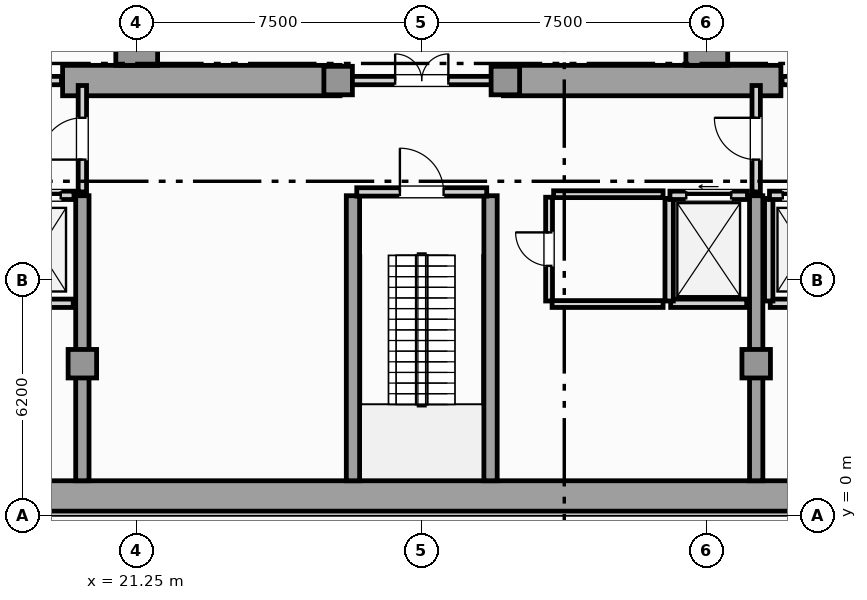
"""IFC4 building model, lengths in metres.
Left out: names, types, materials, properties, quantities, classifications, styles, units other than length and angle.
Written with IfcOpenShell. Run it as: python <this file> out.ifc"""

import sys

from ifc_helpers import new_model, si_unit, direction, frame, frame_2d, origin, origin_2d, place, context, subcontext, project, spatial, rectangle, extrude, element, fill, save


model = new_model("IFC4")
c1 = context("Model", 3, precision=1e-05, world=origin(), true_north=direction((0.0, 1.0)))
c2 = subcontext(c1, "Body", "Model", "MODEL_VIEW")
j1 = project(units=[si_unit("LENGTHUNIT", "METRE"), si_unit("PLANEANGLEUNIT", "RADIAN")], contexts=[c1])
p1 = place(None, origin())
s1 = spatial("IfcSite", under=j1, at=p1, CompositionType="ELEMENT")
p2 = place(p1, origin())
s2 = spatial("IfcBuilding", under=s1, at=p2, CompositionType="ELEMENT")
p3 = place(p2, frame((0.0, 0.0, -10.8)))
s3 = spatial("IfcBuildingStorey", under=s2, at=p3, CompositionType="ELEMENT", Elevation=-10.8)
p4 = place(p3, frame((13.25, 0.52, 0.0), z_axis=(0.0, 0.0, 1.0), x_axis=(1.0, 0.0, 0.0)))
e1 = element("IfcWall", 1, at=p4, inside=s3, PredefinedType="SHEAR", context=c2, shape_type="SweptSolid", body=[
    extrude(rectangle(XDim=31.0, YDim=0.8, at=frame_2d((15.5, 0.0))), origin(), (0.0, 0.0, 1.0), 5.05),
])
for number, where, z_axis, x_axis in (
    (2, (19.3, 11.45, 0.0), (0.0, 0.0, 1.0), (1.0, 0.0, 0.0)),
    (3, (30.9, 11.45, 0.0), (0.0, 0.0, 1.0), (1.0, 0.0, 0.0)),
):
    element("IfcWall", number, at=place(p3, frame(where, z_axis=z_axis, x_axis=x_axis)), inside=s3, PredefinedType="SHEAR", context=c2, shape_type="SweptSolid", body=[
        extrude(rectangle(XDim=7.3, YDim=0.8, at=frame_2d((3.65, 0.0))), origin(), (0.0, 0.0, 1.0), 5.05),
    ])
for number, where, z_axis, x_axis in (
    (4, (19.82, 0.92, 0.0), (0.0, 0.0, 1.0), (0.0, 1.0, 0.0)),
    (5, (26.94, 0.92, 0.0), (0.0, 0.0, 1.0), (0.0, 1.0, 0.0)),
    (6, (30.56, 0.92, 0.0), (0.0, 0.0, 1.0), (0.0, 1.0, 0.0)),
    (7, (37.55, 0.92, 0.0), (0.0, 0.0, 1.0), (0.0, 1.0, 0.0)),
):
    element("IfcWall", number, at=place(p3, frame(where, z_axis=z_axis, x_axis=x_axis)), inside=s3, PredefinedType="SHEAR", context=c2, shape_type="SweptSolid", body=[
        extrude(rectangle(XDim=7.5, YDim=0.35, at=frame_2d((3.75, 0.0))), origin(), (0.0, 0.0, 1.0), 5.05),
    ])
for number, where, z_axis, x_axis in (
    (8, (19.82, 4.0, 0.0), (0.0, 0.0, 1.0), (1.0, 0.0, 0.0)),
    (9, (37.55, 4.0, 0.0), (0.0, 0.0, 1.0), (1.0, 0.0, 0.0)),
    (10, (26.55, 11.45, 0.0), (0.0, 0.0, 1.0), (1.0, 0.0, 0.0)),
    (11, (30.95, 11.45, 0.0), (0.0, 0.0, 1.0), (1.0, 0.0, 0.0)),
):
    element("IfcColumn", number, at=place(p3, frame(where, z_axis=z_axis, x_axis=x_axis)), inside=s3, PredefinedType="COLUMN", context=c2, shape_type="SweptSolid", body=[
        extrude(rectangle(XDim=0.75, YDim=0.75, at=origin_2d()), origin(), (0.0, 0.0, 1.0), 5.4),
    ])
for number, where, z_axis, x_axis in (
    (12, (21.25, 12.4, 0.0), (0.0, 0.0, 1.0), (1.0, 0.0, 0.0)),
    (13, (36.25, 12.4, 0.0), (0.0, 0.0, 1.0), (1.0, 0.0, 0.0)),
):
    element("IfcColumn", number, at=place(p3, frame(where, z_axis=z_axis, x_axis=x_axis)), inside=s3, PredefinedType="COLUMN", context=c2, shape_type="SweptSolid", body=[
        extrude(rectangle(XDim=1.1, YDim=1.1, at=origin_2d()), origin(), (0.0, 0.0, 1.0), 5.4),
    ])
p5 = place(p3, frame((17.8, 5.59, 0.0), z_axis=(0.0, 0.0, 1.0), x_axis=(1.0, 0.0, 0.0)))
e14 = element("IfcWall", 14, at=p5, inside=s3, PredefinedType="SOLIDWALL", context=c2, shape_type="SweptSolid", body=[
    extrude(rectangle(XDim=1.78, YDim=0.22, at=frame_2d((0.89, 0.0))), origin(), (0.0, 0.0, 1.0), 5.05),
])
p6 = place(p3, frame((17.78, 8.43, 0.0), z_axis=(0.0, 0.0, 1.0), x_axis=(1.0, 0.0, 0.0)))
e15 = element("IfcWall", 15, at=p6, inside=s3, PredefinedType="SOLIDWALL", context=c2, shape_type="SweptSolid", body=[
    extrude(rectangle(XDim=1.82, YDim=0.22, at=frame_2d((0.91, 0.0))), origin(), (0.0, 0.0, 1.0), 5.05),
])
p7 = place(p6, frame((0.35, 0.0, 0.0)))
e16 = element("IfcOpeningElement", 16, at=p7, cuts=e15, PredefinedType="OPENING", context=c2, shape_type="SweptSolid", body=[
    extrude(rectangle(XDim=1.12, YDim=2.25, at=frame_2d((0.56, 1.125))), frame((0.0, 0.12, 0.0), z_axis=(0.0, -1.0, 0.0), x_axis=(1.0, 0.0, 0.0)), (0.0, 0.0, 1.0), 0.24),
])
p8 = place(p3, frame((37.92, 5.59, 0.0), z_axis=(0.0, 0.0, 1.0), x_axis=(1.0, 0.0, 0.0)))
e17 = element("IfcWall", 17, at=p8, inside=s3, PredefinedType="SOLIDWALL", context=c2, shape_type="SweptSolid", body=[
    extrude(rectangle(XDim=1.78, YDim=0.22, at=frame_2d((0.89, 0.0))), origin(), (0.0, 0.0, 1.0), 5.05),
])
p9 = place(p3, frame((37.88, 5.65, 0.0), z_axis=(0.0, 0.0, 1.0), x_axis=(0.0, 1.0, 0.0)))
e18 = element("IfcWall", 18, at=p9, inside=s3, PredefinedType="SOLIDWALL", context=c2, shape_type="SweptSolid", body=[
    extrude(rectangle(XDim=2.7, YDim=0.22, at=frame_2d((1.35, 0.0))), origin(), (0.0, 0.0, 1.0), 5.05),
])
p10 = place(p3, frame((37.9, 8.43, 0.0), z_axis=(0.0, 0.0, 1.0), x_axis=(1.0, 0.0, 0.0)))
e19 = element("IfcWall", 19, at=p10, inside=s3, PredefinedType="SOLIDWALL", context=c2, shape_type="SweptSolid", body=[
    extrude(rectangle(XDim=1.82, YDim=0.22, at=frame_2d((0.91, 0.0))), origin(), (0.0, 0.0, 1.0), 5.05),
])
p11 = place(p10, frame((0.35, 0.0, 0.0)))
e20 = element("IfcOpeningElement", 20, at=p11, cuts=e19, PredefinedType="OPENING", context=c2, shape_type="SweptSolid", body=[
    extrude(rectangle(XDim=1.12, YDim=2.25, at=frame_2d((0.56, 1.125))), frame((0.0, 0.12, 0.0), z_axis=(0.0, -1.0, 0.0), x_axis=(1.0, 0.0, 0.0)), (0.0, 0.0, 1.0), 0.24),
])
p12 = place(p3, frame((35.3, 5.59, 0.0), z_axis=(0.0, 0.0, 1.0), x_axis=(1.0, 0.0, 0.0)))
e21 = element("IfcWall", 21, at=p12, inside=s3, PredefinedType="SOLIDWALL", context=c2, shape_type="SweptSolid", body=[
    extrude(rectangle(XDim=2.0, YDim=0.22, at=frame_2d((1.0, 0.0))), origin(), (0.0, 0.0, 1.0), 5.05),
])
p13 = place(p3, frame((35.26, 5.65, 0.0), z_axis=(0.0, 0.0, 1.0), x_axis=(0.0, 1.0, 0.0)))
e22 = element("IfcWall", 22, at=p13, inside=s3, PredefinedType="SOLIDWALL", context=c2, shape_type="SweptSolid", body=[
    extrude(rectangle(XDim=2.7, YDim=0.22, at=frame_2d((1.35, 0.0))), origin(), (0.0, 0.0, 1.0), 5.05),
])
p14 = place(p3, frame((35.28, 8.43, 0.0), z_axis=(0.0, 0.0, 1.0), x_axis=(1.0, 0.0, 0.0)))
e23 = element("IfcWall", 23, at=p14, inside=s3, PredefinedType="SOLIDWALL", context=c2, shape_type="SweptSolid", body=[
    extrude(rectangle(XDim=2.04, YDim=0.22, at=frame_2d((1.02, 0.0))), origin(), (0.0, 0.0, 1.0), 5.05),
])
p15 = place(p14, frame((0.43, 0.0, 0.0)))
e24 = element("IfcOpeningElement", 24, at=p15, cuts=e23, PredefinedType="OPENING", context=c2, shape_type="SweptSolid", body=[
    extrude(rectangle(XDim=1.18, YDim=2.2, at=frame_2d((0.59, 1.1))), frame((0.0, 0.12, 0.0), z_axis=(0.0, -1.0, 0.0), x_axis=(1.0, 0.0, 0.0)), (0.0, 0.0, 1.0), 0.24),
])
p16 = place(p3, frame((27.04, 8.52, 0.0), z_axis=(0.0, 0.0, 1.0), x_axis=(1.0, 0.0, 0.0)))
e25 = element("IfcWall", 25, at=p16, inside=s3, PredefinedType="SOLIDWALL", context=c2, shape_type="SweptSolid", body=[
    extrude(rectangle(XDim=3.42, YDim=0.22, at=frame_2d((1.71, 0.0))), origin(), (0.0, 0.0, 1.0), 5.05),
])
p17 = place(p16, frame((1.135, 0.0, 0.0)))
e26 = element("IfcOpeningElement", 26, at=p17, cuts=e25, PredefinedType="OPENING", context=c2, shape_type="SweptSolid", body=[
    extrude(rectangle(XDim=1.15, YDim=2.2, at=frame_2d((0.575, 1.1))), frame((0.0, 0.12, 0.0), z_axis=(0.0, -1.0, 0.0), x_axis=(1.0, 0.0, 0.0)), (0.0, 0.0, 1.0), 0.24),
])
p18 = place(p3, frame((19.82, 8.52, 0.0), z_axis=(0.0, 0.0, 1.0), x_axis=(0.0, 1.0, 0.0)))
e27 = element("IfcWall", 27, at=p18, inside=s3, PredefinedType="SOLIDWALL", context=c2, shape_type="SweptSolid", body=[
    extrude(rectangle(XDim=2.8, YDim=0.22, at=frame_2d((1.4, 0.0))), origin(), (0.0, 0.0, 1.0), 4.506),
])
p19 = place(p18, frame((0.85, 0.0, 0.0)))
e28 = element("IfcOpeningElement", 28, at=p19, cuts=e27, PredefinedType="OPENING", context=c2, shape_type="SweptSolid", body=[
    extrude(rectangle(XDim=1.1, YDim=2.2, at=frame_2d((0.55, 1.1))), frame((0.0, 0.12, 0.0), z_axis=(0.0, -1.0, 0.0), x_axis=(1.0, 0.0, 0.0)), (0.0, 0.0, 1.0), 0.24),
])
p20 = place(p3, frame((37.55, 8.52, 0.0), z_axis=(0.0, 0.0, 1.0), x_axis=(0.0, 1.0, 0.0)))
e29 = element("IfcWall", 29, at=p20, inside=s3, PredefinedType="SOLIDWALL", context=c2, shape_type="SweptSolid", body=[
    extrude(rectangle(XDim=2.8, YDim=0.22, at=frame_2d((1.4, 0.0))), origin(), (0.0, 0.0, 1.0), 4.506),
])
p21 = place(p20, frame((0.85, 0.0, 0.0)))
e30 = element("IfcOpeningElement", 30, at=p21, cuts=e29, PredefinedType="OPENING", context=c2, shape_type="SweptSolid", body=[
    extrude(rectangle(XDim=1.1, YDim=2.2, at=frame_2d((0.55, 1.1))), frame((0.0, 0.12, 0.0), z_axis=(0.0, -1.0, 0.0), x_axis=(1.0, 0.0, 0.0)), (0.0, 0.0, 1.0), 0.24),
])
p22 = place(p3, frame((16.23, 11.45, 0.0), z_axis=(0.0, 0.0, 1.0), x_axis=(1.0, 0.0, 0.0)))
e31 = element("IfcWall", 31, at=p22, inside=s3, PredefinedType="SOLIDWALL", context=c2, shape_type="SweptSolid", body=[
    extrude(rectangle(XDim=3.04, YDim=0.22, at=frame_2d((1.52, 0.0))), origin(), (0.0, 0.0, 1.0), 5.05),
])
p23 = place(p22, frame((0.97, 0.0, 0.0)))
e32 = element("IfcOpeningElement", 32, at=p23, cuts=e31, PredefinedType="OPENING", context=c2, shape_type="SweptSolid", body=[
    extrude(rectangle(XDim=1.1, YDim=2.2, at=frame_2d((0.55, 1.1))), frame((0.0, 0.12, 0.0), z_axis=(0.0, -1.0, 0.0), x_axis=(1.0, 0.0, 0.0)), (0.0, 0.0, 1.0), 0.24),
])
p24 = place(p3, frame((26.63, 11.45, 0.0), z_axis=(0.0, 0.0, 1.0), x_axis=(1.0, 0.0, 0.0)))
e33 = element("IfcWall", 33, at=p24, inside=s3, PredefinedType="SOLIDWALL", context=c2, shape_type="SweptSolid", body=[
    extrude(rectangle(XDim=4.24, YDim=0.22, at=frame_2d((2.12, 0.0))), origin(), (0.0, 0.0, 1.0), 5.05),
])
p25 = place(p24, frame((1.42, 0.0, 0.0)))
e34 = element("IfcOpeningElement", 34, at=p25, cuts=e33, PredefinedType="OPENING", context=c2, shape_type="SweptSolid", body=[
    extrude(rectangle(XDim=1.4, YDim=2.2, at=frame_2d((0.7, 1.1))), frame((0.0, 0.12, 0.0), z_axis=(0.0, -1.0, 0.0), x_axis=(1.0, 0.0, 0.0)), (0.0, 0.0, 1.0), 0.24),
])
p26 = place(p3, frame((38.23, 11.45, 0.0), z_axis=(0.0, 0.0, 1.0), x_axis=(1.0, 0.0, 0.0)))
e35 = element("IfcWall", 35, at=p26, inside=s3, PredefinedType="SOLIDWALL", context=c2, shape_type="SweptSolid", body=[
    extrude(rectangle(XDim=3.04, YDim=0.22, at=frame_2d((1.52, 0.0))), origin(), (0.0, 0.0, 1.0), 5.05),
])
p27 = place(p26, frame((0.97, 0.0, 0.0)))
e36 = element("IfcOpeningElement", 36, at=p27, cuts=e35, PredefinedType="OPENING", context=c2, shape_type="SweptSolid", body=[
    extrude(rectangle(XDim=1.1, YDim=2.2, at=frame_2d((0.55, 1.1))), frame((0.0, 0.12, 0.0), z_axis=(0.0, -1.0, 0.0), x_axis=(1.0, 0.0, 0.0)), (0.0, 0.0, 1.0), 0.24),
])
p28 = place(p3, frame((32.1, 5.65, 0.0), z_axis=(0.0, 0.0, 1.0), x_axis=(0.0, 1.0, 0.0)))
e37 = element("IfcWall", 37, at=p28, inside=s3, PredefinedType="PARTITIONING", context=c2, shape_type="SweptSolid", body=[
    extrude(rectangle(XDim=2.73, YDim=0.18, at=frame_2d((1.365, 0.0))), origin(), (0.0, 0.0, 1.0), 5.05),
])
p29 = place(p28, frame((0.925, 0.0, 0.0)))
e38 = element("IfcOpeningElement", 38, at=p29, cuts=e37, PredefinedType="OPENING", context=c2, shape_type="SweptSolid", body=[
    extrude(rectangle(XDim=0.88, YDim=2.05, at=frame_2d((0.44, 1.025))), frame((0.0, 0.1, 0.0), z_axis=(0.0, -1.0, 0.0), x_axis=(1.0, 0.0, 0.0)), (0.0, 0.0, 1.0), 0.2),
])
p30 = place(p3, frame((32.22, 8.46, 0.0), z_axis=(0.0, 0.0, 1.0), x_axis=(1.0, 0.0, 0.0)))
e39 = element("IfcWall", 39, at=p30, inside=s3, PredefinedType="PARTITIONING", context=c2, shape_type="SweptSolid", body=[
    extrude(rectangle(XDim=2.88, YDim=0.18, at=frame_2d((1.44, 0.0))), origin(), (0.0, 0.0, 1.0), 5.05),
])
p31 = place(p3, frame((32.18, 5.57, 0.0), z_axis=(0.0, 0.0, 1.0), x_axis=(1.0, 0.0, 0.0)))
e40 = element("IfcWall", 40, at=p31, inside=s3, PredefinedType="PARTITIONING", context=c2, shape_type="SweptSolid", body=[
    extrude(rectangle(XDim=2.92, YDim=0.18, at=frame_2d((1.46, 0.0))), origin(), (0.0, 0.0, 1.0), 5.05),
])
p32 = place(p7, origin())
e41 = element("IfcDoor", 41, at=p32, inside=s3, OperationType="SLIDING_TO_LEFT", PredefinedType="DOOR", context=c2, shape_type="SweptSolid", body=[
    extrude(rectangle(XDim=1.12, YDim=2.25, at=frame_2d((0.56, 1.125))), frame((0.0, 0.025, 0.0), z_axis=(0.0, -1.0, 0.0), x_axis=(1.0, 0.0, 0.0)), (0.0, 0.0, 1.0), 0.05),
])
fill(e16, e41)
p33 = place(p11, origin())
e42 = element("IfcDoor", 42, at=p33, inside=s3, OperationType="SLIDING_TO_RIGHT", PredefinedType="DOOR", context=c2, shape_type="SweptSolid", body=[
    extrude(rectangle(XDim=1.12, YDim=2.25, at=frame_2d((0.56, 1.125))), frame((0.0, 0.025, 0.0), z_axis=(0.0, -1.0, 0.0), x_axis=(1.0, 0.0, 0.0)), (0.0, 0.0, 1.0), 0.05),
])
fill(e20, e42)
p34 = place(p15, origin())
e43 = element("IfcDoor", 43, at=p34, inside=s3, OperationType="SLIDING_TO_LEFT", PredefinedType="DOOR", context=c2, shape_type="SweptSolid", body=[
    extrude(rectangle(XDim=1.18, YDim=2.2, at=frame_2d((0.59, 1.1))), frame((0.0, 0.025, 0.0), z_axis=(0.0, -1.0, 0.0), x_axis=(1.0, 0.0, 0.0)), (0.0, 0.0, 1.0), 0.05),
])
fill(e24, e43)
p35 = place(p17, origin())
e44 = element("IfcDoor", 44, at=p35, inside=s3, OperationType="SINGLE_SWING_LEFT", PredefinedType="DOOR", context=c2, shape_type="SweptSolid", body=[
    extrude(rectangle(XDim=1.15, YDim=2.2, at=frame_2d((0.575, 1.1))), frame((0.0, 0.025, 0.0), z_axis=(0.0, -1.0, 0.0), x_axis=(1.0, 0.0, 0.0)), (0.0, 0.0, 1.0), 0.05),
])
fill(e26, e44)
p36 = place(p19, origin())
e45 = element("IfcDoor", 45, at=p36, inside=s3, OperationType="SINGLE_SWING_LEFT", PredefinedType="DOOR", context=c2, shape_type="SweptSolid", body=[
    extrude(rectangle(XDim=1.1, YDim=2.2, at=frame_2d((0.55, 1.1))), frame((0.0, 0.025, 0.0), z_axis=(0.0, -1.0, 0.0), x_axis=(1.0, 0.0, 0.0)), (0.0, 0.0, 1.0), 0.05),
])
fill(e28, e45)
p37 = place(p21, origin())
e46 = element("IfcDoor", 46, at=p37, inside=s3, OperationType="SINGLE_SWING_RIGHT", PredefinedType="DOOR", context=c2, shape_type="SweptSolid", body=[
    extrude(rectangle(XDim=1.1, YDim=2.2, at=frame_2d((0.55, 1.1))), frame((0.0, 0.025, 0.0), z_axis=(0.0, -1.0, 0.0), x_axis=(1.0, 0.0, 0.0)), (0.0, 0.0, 1.0), 0.05),
])
fill(e30, e46)
p38 = place(p25, origin())
e47 = element("IfcDoor", 47, at=p38, inside=s3, OperationType="DOUBLE_DOOR_SINGLE_SWING", PredefinedType="DOOR", context=c2, shape_type="SweptSolid", body=[
    extrude(rectangle(XDim=1.4, YDim=2.2, at=frame_2d((0.7, 1.1))), frame((0.0, 0.025, 0.0), z_axis=(0.0, -1.0, 0.0), x_axis=(1.0, 0.0, 0.0)), (0.0, 0.0, 1.0), 0.05),
])
fill(e34, e47)
p39 = place(p29, origin())
e48 = element("IfcDoor", 48, at=p39, inside=s3, OperationType="SINGLE_SWING_RIGHT", PredefinedType="DOOR", context=c2, shape_type="SweptSolid", body=[
    extrude(rectangle(XDim=0.88, YDim=2.05, at=frame_2d((0.44, 1.025))), frame((0.0, 0.025, 0.0), z_axis=(0.0, -1.0, 0.0), x_axis=(1.0, 0.0, 0.0)), (0.0, 0.0, 1.0), 0.05),
])
fill(e38, e48)
save(model, sys.argv[1])
